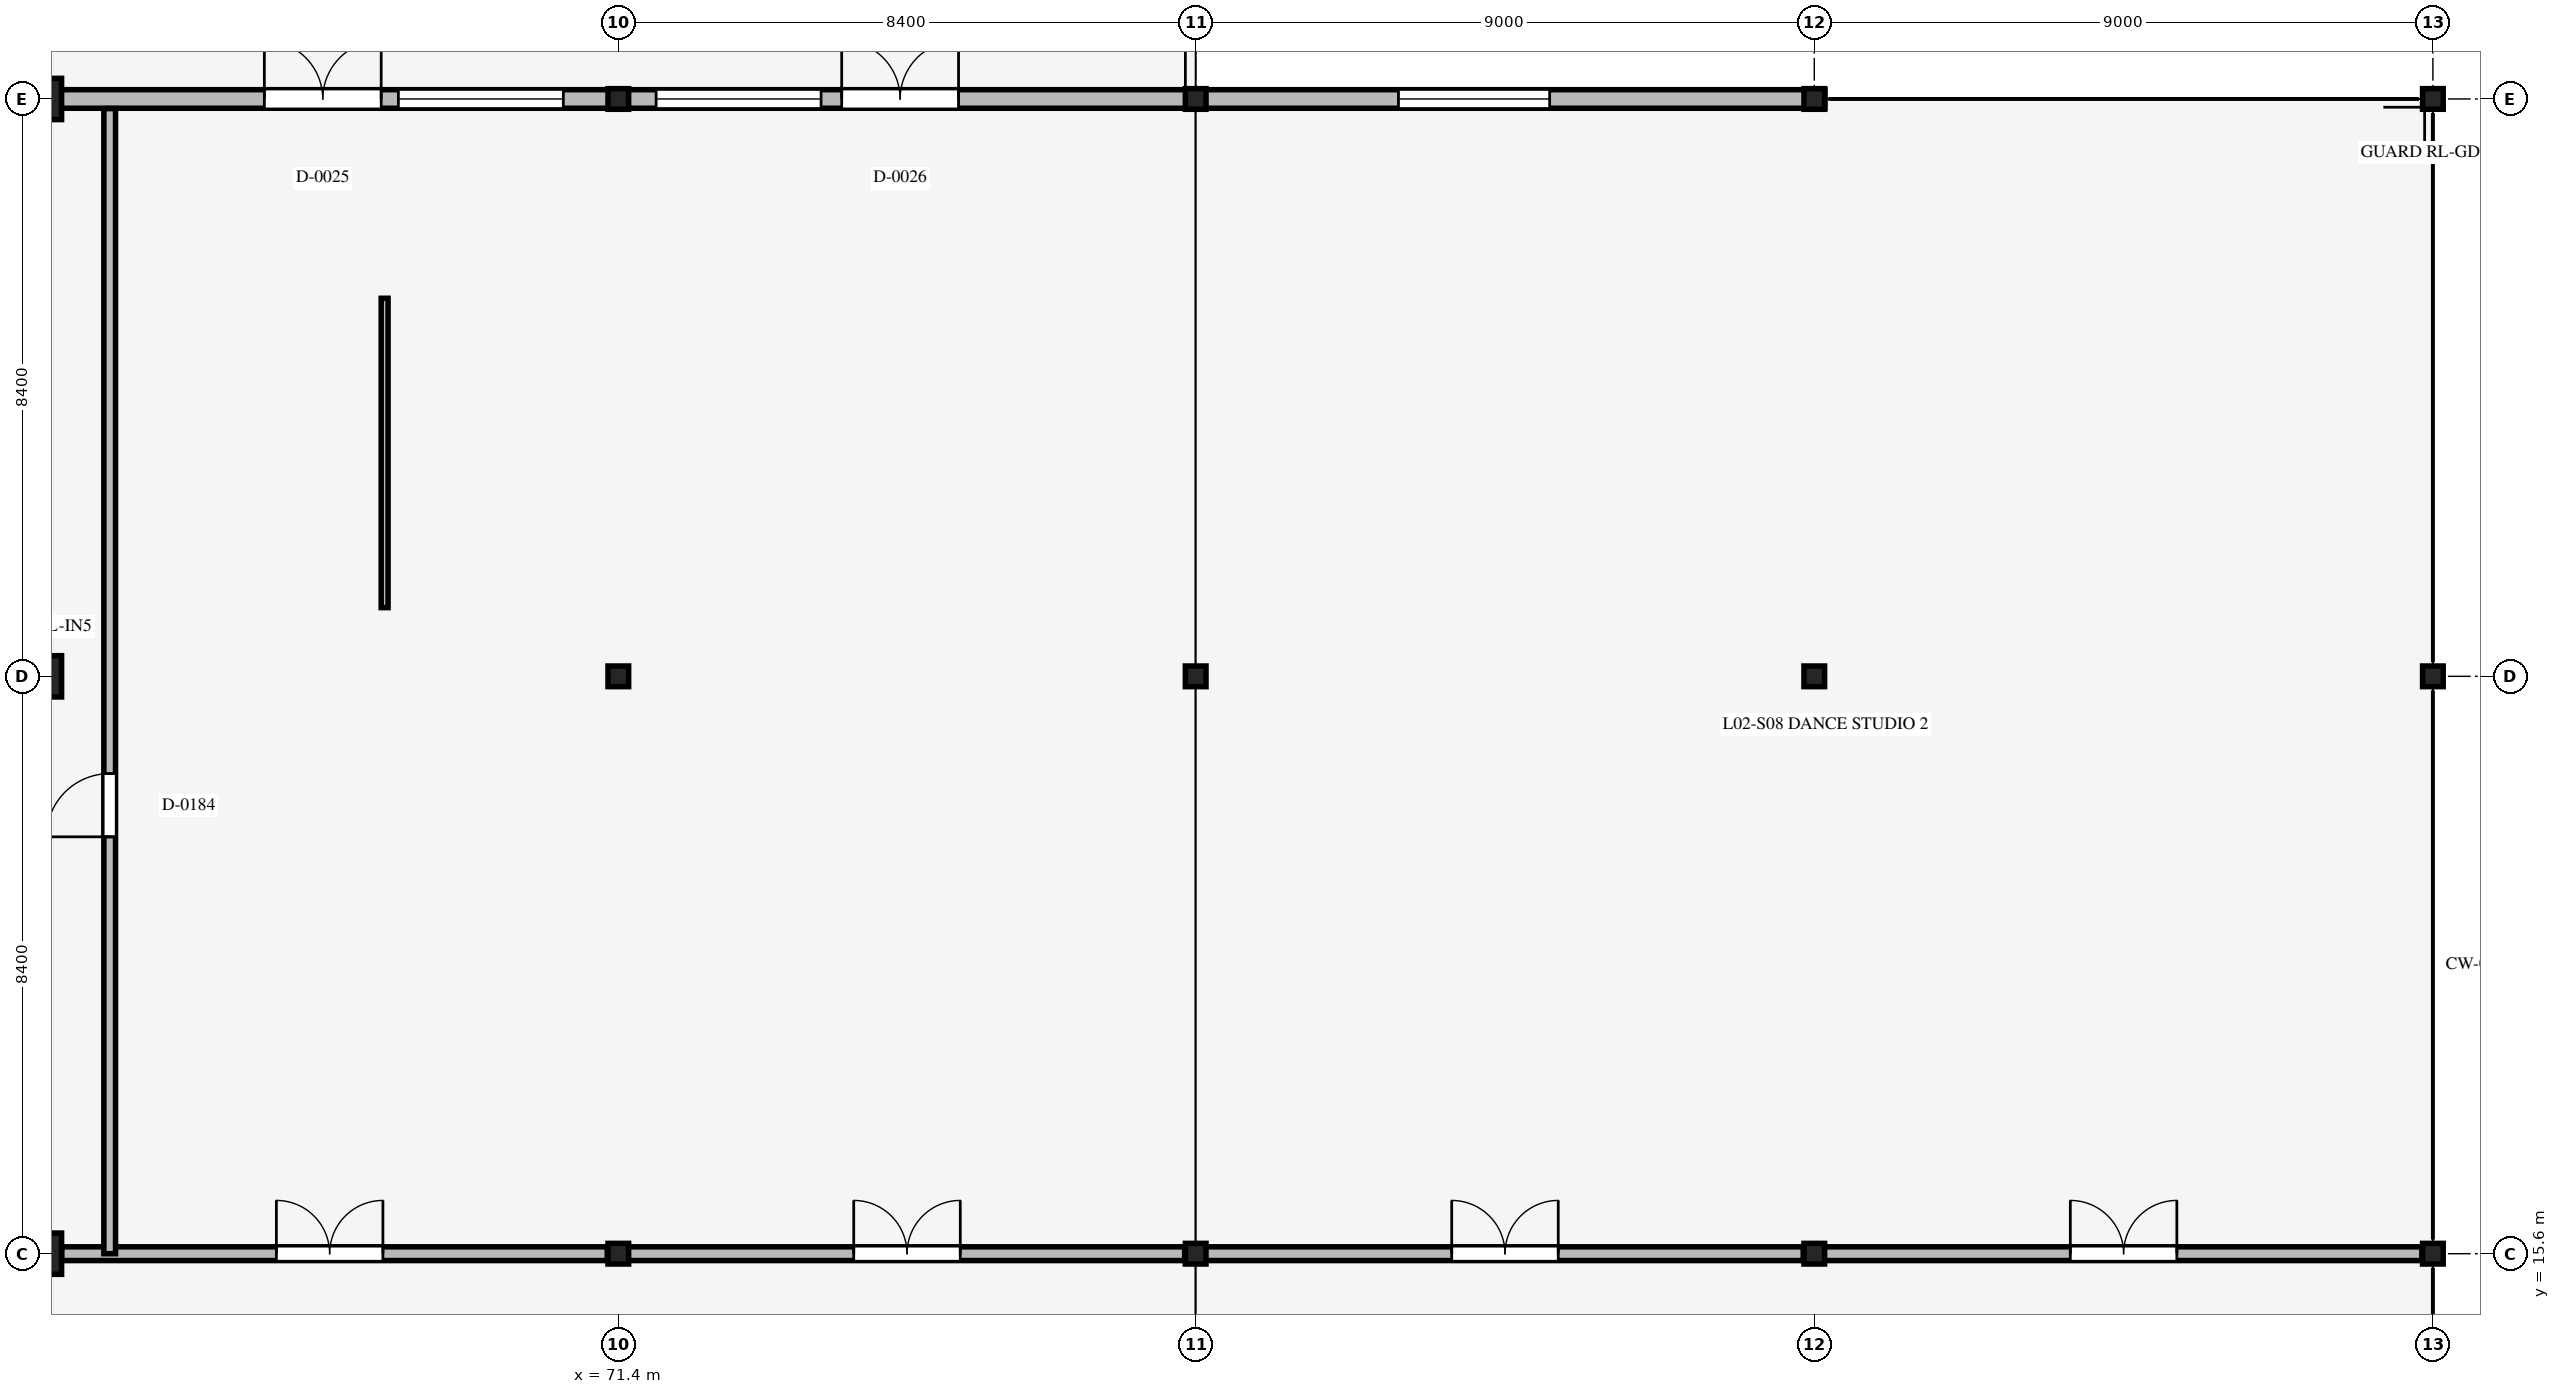
"""IFC4 building model, lengths in metres.
Left out: names, types, materials, properties, quantities, classifications, styles, units other than length and angle.
Written with IfcOpenShell. Run it as: python <this file> out.ifc"""

import sys

from ifc_helpers import new_model, si_unit, direction, frame, frame_2d, origin, origin_2d, place, context, subcontext, project, spatial, rectangle, i_section, extrude, element, fill, save


model = new_model("IFC4")
c1 = context("Model", 3, precision=1e-05, world=origin(), true_north=direction((0.0, 1.0)))
c2 = subcontext(c1, "Body", "Model", "MODEL_VIEW")
j1 = project(units=[si_unit("LENGTHUNIT", "METRE"), si_unit("PLANEANGLEUNIT", "RADIAN")], contexts=[c1])
p1 = place(None, origin())
s1 = spatial("IfcSite", under=j1, at=p1, CompositionType="ELEMENT")
p2 = place(p1, origin())
s2 = spatial("IfcBuilding", under=s1, at=p2, CompositionType="ELEMENT")
p3 = place(p2, frame((0.0, 0.0, 12.0)))
s3 = spatial("IfcBuildingStorey", under=s2, at=p3, CompositionType="ELEMENT", Elevation=12.0)
for number, where, z_axis, x_axis in (
    (1, (63.0, 15.6, 0.0), (0.0, 0.0, 1.0), (1.0, 0.0, 0.0)),
    (2, (63.0, 24.0, 0.0), (0.0, 0.0, 1.0), (1.0, 0.0, 0.0)),
    (3, (63.0, 32.4, 0.0), (0.0, 0.0, 1.0), (1.0, 0.0, 0.0)),
):
    element("IfcColumn", number, at=place(p3, frame(where, z_axis=z_axis, x_axis=x_axis)), inside=s3, PredefinedType="COLUMN", context=c2, shape_type="SweptSolid", body=[
        extrude(rectangle(XDim=0.6, YDim=0.6, at=origin_2d()), origin(), (0.0, 0.0, 1.0), 3.9),
    ])
for number, where, z_axis, x_axis in (
    (4, (71.4, 15.6, 0.0), (0.0, 0.0, 1.0), (1.0, 0.0, 0.0)),
    (5, (71.4, 24.0, 0.0), (0.0, 0.0, 1.0), (1.0, 0.0, 0.0)),
    (6, (71.4, 32.4, 0.0), (0.0, 0.0, 1.0), (1.0, 0.0, 0.0)),
    (7, (79.8, 15.6, 0.0), (0.0, 0.0, 1.0), (1.0, 0.0, 0.0)),
    (8, (79.8, 24.0, 0.0), (0.0, 0.0, 1.0), (1.0, 0.0, 0.0)),
    (9, (79.8, 32.4, 0.0), (0.0, 0.0, 1.0), (1.0, 0.0, 0.0)),
    (10, (88.8, 15.6, 0.0), (0.0, 0.0, 1.0), (1.0, 0.0, 0.0)),
    (11, (88.8, 24.0, 0.0), (0.0, 0.0, 1.0), (1.0, 0.0, 0.0)),
    (12, (88.8, 32.4, 0.0), (0.0, 0.0, 1.0), (1.0, 0.0, 0.0)),
    (13, (97.8, 15.6, 0.0), (0.0, 0.0, 1.0), (1.0, 0.0, 0.0)),
    (14, (97.8, 24.0, 0.0), (0.0, 0.0, 1.0), (1.0, 0.0, 0.0)),
    (15, (97.8, 32.4, 0.0), (0.0, 0.0, 1.0), (1.0, 0.0, 0.0)),
):
    element("IfcColumn", number, at=place(p3, frame(where, z_axis=z_axis, x_axis=x_axis)), inside=s3, PredefinedType="COLUMN", context=c2, shape_type="SweptSolid", body=[
        extrude(i_section(OverallWidth=0.3, OverallDepth=0.3, WebThickness=0.011, FlangeThickness=0.019, FilletRadius=0.027, at=origin_2d()), origin(), (0.0, 0.0, 1.0), 3.9),
    ])
p4 = place(p3, frame((63.29, 32.4, 0.0), z_axis=(0.0, 0.0, 1.0), x_axis=(1.0, 0.0, 0.0)))
e16 = element("IfcWall", 16, at=p4, inside=s3, PredefinedType="STANDARD", context=c2, shape_type="SweptSolid", body=[
    extrude(rectangle(XDim=8.245, YDim=0.27, at=frame_2d((4.123, 0.0))), origin(), (0.0, 0.0, 1.0), 3.271),
])
p5 = place(p4, frame((2.96, 0.0, 0.0)))
e17 = element("IfcOpeningElement", 17, at=p5, cuts=e16, PredefinedType="OPENING", context=c2, shape_type="SweptSolid", body=[
    extrude(rectangle(XDim=1.7, YDim=2.3, at=frame_2d((0.85, 1.15))), frame((0.0, 0.145, 0.0), z_axis=(0.0, -1.0, 0.0), x_axis=(1.0, 0.0, 0.0)), (0.0, 0.0, 1.0), 0.29),
])
p6 = place(p4, frame((4.91, 0.0, 0.9)))
e18 = element("IfcOpeningElement", 18, at=p6, cuts=e16, PredefinedType="OPENING", context=c2, shape_type="SweptSolid", body=[
    extrude(rectangle(XDim=2.4, YDim=2.1, at=frame_2d((1.2, 1.05))), frame((0.0, 0.145, 0.0), z_axis=(0.0, -1.0, 0.0), x_axis=(1.0, 0.0, 0.0)), (0.0, 0.0, 1.0), 0.29),
])
p7 = place(p3, frame((71.54, 32.4, 0.0), z_axis=(0.0, 0.0, 1.0), x_axis=(1.0, 0.0, 0.0)))
e19 = element("IfcWall", 19, at=p7, inside=s3, PredefinedType="STANDARD", context=c2, shape_type="SweptSolid", body=[
    extrude(rectangle(XDim=8.395, YDim=0.27, at=frame_2d((4.198, 0.0))), origin(), (0.0, 0.0, 1.0), 3.271),
])
p8 = place(p7, frame((3.11, 0.0, 0.0)))
e20 = element("IfcOpeningElement", 20, at=p8, cuts=e19, PredefinedType="OPENING", context=c2, shape_type="SweptSolid", body=[
    extrude(rectangle(XDim=1.7, YDim=2.3, at=frame_2d((0.85, 1.15))), frame((0.0, 0.145, 0.0), z_axis=(0.0, -1.0, 0.0), x_axis=(1.0, 0.0, 0.0)), (0.0, 0.0, 1.0), 0.29),
])
p9 = place(p7, frame((0.41, 0.0, 0.9)))
e21 = element("IfcOpeningElement", 21, at=p9, cuts=e19, PredefinedType="OPENING", context=c2, shape_type="SweptSolid", body=[
    extrude(rectangle(XDim=2.4, YDim=2.1, at=frame_2d((1.2, 1.05))), frame((0.0, 0.145, 0.0), z_axis=(0.0, -1.0, 0.0), x_axis=(1.0, 0.0, 0.0)), (0.0, 0.0, 1.0), 0.29),
])
p10 = place(p3, frame((79.94, 32.4, 0.0), z_axis=(0.0, 0.0, 1.0), x_axis=(1.0, 0.0, 0.0)))
e22 = element("IfcWall", 22, at=p10, inside=s3, PredefinedType="STANDARD", context=c2, shape_type="SweptSolid", body=[
    extrude(rectangle(XDim=9.015, YDim=0.27, at=frame_2d((4.508, 0.0))), origin(), (0.0, 0.0, 1.0), 3.64),
])
p11 = place(p10, frame((2.81, 0.0, 0.95)))
e23 = element("IfcOpeningElement", 23, at=p11, cuts=e22, PredefinedType="OPENING", context=c2, shape_type="SweptSolid", body=[
    extrude(rectangle(XDim=2.2, YDim=1.9, at=frame_2d((1.1, 0.95))), frame((0.0, 0.145, 0.0), z_axis=(0.0, -1.0, 0.0), x_axis=(1.0, 0.0, 0.0)), (0.0, 0.0, 1.0), 0.29),
])
p12 = place(p3, frame((63.3, 15.6, 0.0), z_axis=(0.0, 0.0, 1.0), x_axis=(1.0, 0.0, 0.0)))
e24 = element("IfcWall", 24, at=p12, inside=s3, PredefinedType="STANDARD", context=c2, shape_type="SweptSolid", body=[
    extrude(rectangle(XDim=7.94, YDim=0.2, at=frame_2d((3.97, 0.0))), origin(), (0.0, 0.0, 1.0), 2.971),
])
p13 = place(p12, frame((3.125, 0.0, 0.0)))
e25 = element("IfcOpeningElement", 25, at=p13, cuts=e24, PredefinedType="OPENING", context=c2, shape_type="SweptSolid", body=[
    extrude(rectangle(XDim=1.55, YDim=2.25, at=frame_2d((0.775, 1.125))), frame((0.0, 0.11, 0.0), z_axis=(0.0, -1.0, 0.0), x_axis=(1.0, 0.0, 0.0)), (0.0, 0.0, 1.0), 0.22),
])
p14 = place(p3, frame((71.245, 15.6, 0.0), z_axis=(0.0, 0.0, 1.0), x_axis=(1.0, 0.0, 0.0)))
e26 = element("IfcWall", 26, at=p14, inside=s3, PredefinedType="STANDARD", context=c2, shape_type="SweptSolid", body=[
    extrude(rectangle(XDim=8.395, YDim=0.2, at=frame_2d((4.197, 0.0))), origin(), (0.0, 0.0, 1.0), 2.901),
])
p15 = place(p14, frame((3.58, 0.0, 0.0)))
e27 = element("IfcOpeningElement", 27, at=p15, cuts=e26, PredefinedType="OPENING", context=c2, shape_type="SweptSolid", body=[
    extrude(rectangle(XDim=1.55, YDim=2.25, at=frame_2d((0.775, 1.125))), frame((0.0, 0.11, 0.0), z_axis=(0.0, -1.0, 0.0), x_axis=(1.0, 0.0, 0.0)), (0.0, 0.0, 1.0), 0.22),
])
p16 = place(p3, frame((79.645, 15.6, 0.0), z_axis=(0.0, 0.0, 1.0), x_axis=(1.0, 0.0, 0.0)))
e28 = element("IfcWall", 28, at=p16, inside=s3, PredefinedType="STANDARD", context=c2, shape_type="SweptSolid", body=[
    extrude(rectangle(XDim=8.995, YDim=0.2, at=frame_2d((4.498, 0.0))), origin(), (0.0, 0.0, 1.0), 3.05),
])
p17 = place(p16, frame((3.88, 0.0, 0.0)))
e29 = element("IfcOpeningElement", 29, at=p17, cuts=e28, PredefinedType="OPENING", context=c2, shape_type="SweptSolid", body=[
    extrude(rectangle(XDim=1.55, YDim=2.25, at=frame_2d((0.775, 1.125))), frame((0.0, 0.11, 0.0), z_axis=(0.0, -1.0, 0.0), x_axis=(1.0, 0.0, 0.0)), (0.0, 0.0, 1.0), 0.22),
])
p18 = place(p3, frame((88.645, 15.6, 0.0), z_axis=(0.0, 0.0, 1.0), x_axis=(1.0, 0.0, 0.0)))
e30 = element("IfcWall", 30, at=p18, inside=s3, PredefinedType="STANDARD", context=c2, shape_type="SweptSolid", body=[
    extrude(rectangle(XDim=8.995, YDim=0.2, at=frame_2d((4.498, 0.0))), origin(), (0.0, 0.0, 1.0), 3.05),
])
p19 = place(p18, frame((3.88, 0.0, 0.0)))
e31 = element("IfcOpeningElement", 31, at=p19, cuts=e30, PredefinedType="OPENING", context=c2, shape_type="SweptSolid", body=[
    extrude(rectangle(XDim=1.55, YDim=2.25, at=frame_2d((0.775, 1.125))), frame((0.0, 0.11, 0.0), z_axis=(0.0, -1.0, 0.0), x_axis=(1.0, 0.0, 0.0)), (0.0, 0.0, 1.0), 0.22),
])
p20 = place(p3, frame((64.0, 15.6, 0.0), z_axis=(0.0, 0.0, 1.0), x_axis=(0.0, 1.0, 0.0)))
e32 = element("IfcWall", 32, at=p20, inside=s3, PredefinedType="STANDARD", context=c2, shape_type="SweptSolid", body=[
    extrude(rectangle(XDim=16.66, YDim=0.17, at=frame_2d((8.33, 0.0))), origin(), (0.0, 0.0, 1.0), 3.05),
])
p21 = place(p20, frame((6.065, 0.0, 0.0)))
e33 = element("IfcOpeningElement", 33, at=p21, cuts=e32, PredefinedType="OPENING", context=c2, shape_type="SweptSolid", body=[
    extrude(rectangle(XDim=0.92, YDim=2.15, at=frame_2d((0.46, 1.075))), frame((0.0, 0.095, 0.0), z_axis=(0.0, -1.0, 0.0), x_axis=(1.0, 0.0, 0.0)), (0.0, 0.0, 1.0), 0.19),
])
p22 = place(p3, frame((68.0, 25.0, 0.0), z_axis=(0.0, 0.0, 1.0), x_axis=(0.0, 1.0, 0.0)))
e34 = element("IfcWall", 34, at=p22, inside=s3, PredefinedType="STANDARD", context=c2, shape_type="SweptSolid", body=[
    extrude(rectangle(XDim=4.5, YDim=0.1, at=frame_2d((2.25, 0.0))), origin(), (0.0, 0.0, 1.0), 3.05),
])
p23 = place(p5, origin())
e35 = element("IfcDoor", 35, at=p23, inside=s3, OperationType="DOUBLE_DOOR_SINGLE_SWING", PredefinedType="DOOR", context=c2, shape_type="SweptSolid", body=[
    extrude(rectangle(XDim=1.7, YDim=2.3, at=frame_2d((0.85, 1.15))), frame((0.0, 0.025, 0.0), z_axis=(0.0, -1.0, 0.0), x_axis=(1.0, 0.0, 0.0)), (0.0, 0.0, 1.0), 0.05),
])
fill(e17, e35)
p24 = place(p6, origin())
e36 = element("IfcWindow", 36, at=p24, inside=s3, PartitioningType="SINGLE_PANEL", PredefinedType="WINDOW", context=c2, shape_type="SweptSolid", body=[
    extrude(rectangle(XDim=2.4, YDim=2.1, at=frame_2d((1.2, 1.05))), frame((0.0, 0.03, 0.0), z_axis=(0.0, -1.0, 0.0), x_axis=(1.0, 0.0, 0.0)), (0.0, 0.0, 1.0), 0.06),
])
fill(e18, e36)
p25 = place(p8, origin())
e37 = element("IfcDoor", 37, at=p25, inside=s3, OperationType="DOUBLE_DOOR_SINGLE_SWING", PredefinedType="DOOR", context=c2, shape_type="SweptSolid", body=[
    extrude(rectangle(XDim=1.7, YDim=2.3, at=frame_2d((0.85, 1.15))), frame((0.0, 0.025, 0.0), z_axis=(0.0, -1.0, 0.0), x_axis=(1.0, 0.0, 0.0)), (0.0, 0.0, 1.0), 0.05),
])
fill(e20, e37)
p26 = place(p9, origin())
e38 = element("IfcWindow", 38, at=p26, inside=s3, PartitioningType="SINGLE_PANEL", PredefinedType="WINDOW", context=c2, shape_type="SweptSolid", body=[
    extrude(rectangle(XDim=2.4, YDim=2.1, at=frame_2d((1.2, 1.05))), frame((0.0, 0.03, 0.0), z_axis=(0.0, -1.0, 0.0), x_axis=(1.0, 0.0, 0.0)), (0.0, 0.0, 1.0), 0.06),
])
fill(e21, e38)
p27 = place(p11, origin())
e39 = element("IfcWindow", 39, at=p27, inside=s3, PartitioningType="SINGLE_PANEL", PredefinedType="WINDOW", context=c2, shape_type="SweptSolid", body=[
    extrude(rectangle(XDim=2.2, YDim=1.9, at=frame_2d((1.1, 0.95))), frame((0.0, 0.03, 0.0), z_axis=(0.0, -1.0, 0.0), x_axis=(1.0, 0.0, 0.0)), (0.0, 0.0, 1.0), 0.06),
])
fill(e23, e39)
p28 = place(p13, origin())
e40 = element("IfcDoor", 40, at=p28, inside=s3, OperationType="DOUBLE_DOOR_SINGLE_SWING", PredefinedType="DOOR", context=c2, shape_type="SweptSolid", body=[
    extrude(rectangle(XDim=1.55, YDim=2.25, at=frame_2d((0.775, 1.125))), frame((0.0, 0.025, 0.0), z_axis=(0.0, -1.0, 0.0), x_axis=(1.0, 0.0, 0.0)), (0.0, 0.0, 1.0), 0.05),
])
fill(e25, e40)
p29 = place(p15, origin())
e41 = element("IfcDoor", 41, at=p29, inside=s3, OperationType="DOUBLE_DOOR_SINGLE_SWING", PredefinedType="DOOR", context=c2, shape_type="SweptSolid", body=[
    extrude(rectangle(XDim=1.55, YDim=2.25, at=frame_2d((0.775, 1.125))), frame((0.0, 0.025, 0.0), z_axis=(0.0, -1.0, 0.0), x_axis=(1.0, 0.0, 0.0)), (0.0, 0.0, 1.0), 0.05),
])
fill(e27, e41)
p30 = place(p17, origin())
e42 = element("IfcDoor", 42, at=p30, inside=s3, OperationType="DOUBLE_DOOR_SINGLE_SWING", PredefinedType="DOOR", context=c2, shape_type="SweptSolid", body=[
    extrude(rectangle(XDim=1.55, YDim=2.25, at=frame_2d((0.775, 1.125))), frame((0.0, 0.025, 0.0), z_axis=(0.0, -1.0, 0.0), x_axis=(1.0, 0.0, 0.0)), (0.0, 0.0, 1.0), 0.05),
])
fill(e29, e42)
p31 = place(p19, origin())
e43 = element("IfcDoor", 43, at=p31, inside=s3, OperationType="DOUBLE_DOOR_SINGLE_SWING", PredefinedType="DOOR", context=c2, shape_type="SweptSolid", body=[
    extrude(rectangle(XDim=1.55, YDim=2.25, at=frame_2d((0.775, 1.125))), frame((0.0, 0.025, 0.0), z_axis=(0.0, -1.0, 0.0), x_axis=(1.0, 0.0, 0.0)), (0.0, 0.0, 1.0), 0.05),
])
fill(e31, e43)
p32 = place(p21, origin())
e44 = element("IfcDoor", 44, at=p32, inside=s3, OperationType="SINGLE_SWING_LEFT", PredefinedType="DOOR", context=c2, shape_type="SweptSolid", body=[
    extrude(rectangle(XDim=0.92, YDim=2.15, at=frame_2d((0.46, 1.075))), frame((0.0, 0.025, 0.0), z_axis=(0.0, -1.0, 0.0), x_axis=(1.0, 0.0, 0.0)), (0.0, 0.0, 1.0), 0.05),
])
fill(e33, e44)
save(model, sys.argv[1])
